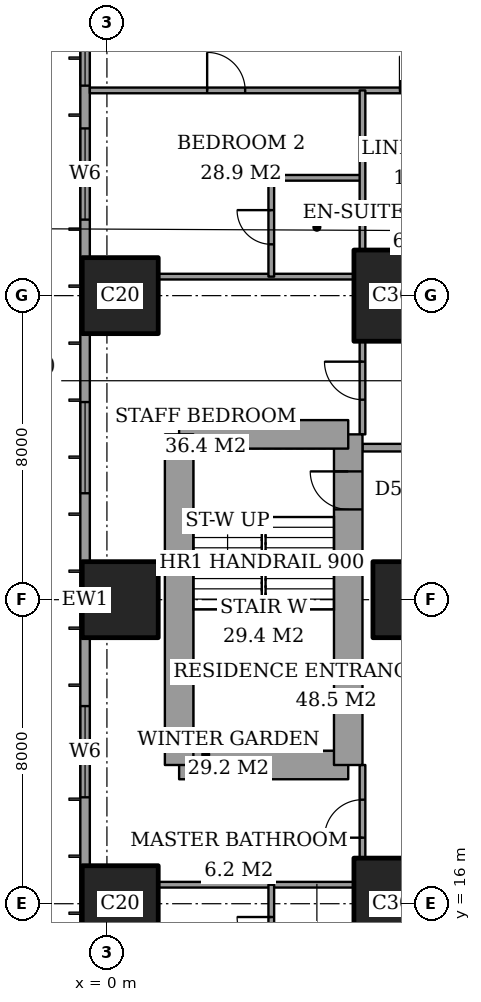
"""IFC4 building model, lengths in metres.
Left out: names, types, materials, properties, quantities, classifications, styles, units other than length and angle.
Written with IfcOpenShell. Run it as: python <this file> out.ifc"""

import sys

from ifc_helpers import new_model, si_unit, direction, frame, frame_2d, origin, origin_2d, place, context, subcontext, project, spatial, rectangle, extrude, element, fill, save


model = new_model("IFC4")
c1 = context("Model", 3, precision=1e-05, world=origin(), true_north=direction((0.0, 1.0)))
c2 = subcontext(c1, "Body", "Model", "MODEL_VIEW")
j1 = project(units=[si_unit("LENGTHUNIT", "METRE"), si_unit("PLANEANGLEUNIT", "RADIAN")], contexts=[c1])
p1 = place(None, origin())
s1 = spatial("IfcSite", under=j1, at=p1, CompositionType="ELEMENT")
p2 = place(p1, origin())
s2 = spatial("IfcBuilding", under=s1, at=p2, CompositionType="ELEMENT")
p3 = place(p2, frame((0.0, 0.0, 54.8)))
s3 = spatial("IfcBuildingStorey", under=s2, at=p3, CompositionType="ELEMENT", Elevation=54.8)
for number, where, z_axis, x_axis in (
    (1, (0.35, 16.0, 0.0), (0.0, 0.0, 1.0), (1.0, 0.0, 0.0)),
    (2, (0.35, 24.0, 0.0), (0.0, 0.0, 1.0), (1.0, 0.0, 0.0)),
    (3, (0.35, 32.0, 0.0), (0.0, 0.0, 1.0), (1.0, 0.0, 0.0)),
):
    element("IfcColumn", number, at=place(p3, frame(where, z_axis=z_axis, x_axis=x_axis)), inside=s3, PredefinedType="COLUMN", context=c2, shape_type="SweptSolid", body=[
        extrude(rectangle(XDim=2.0, YDim=2.0, at=origin_2d()), origin(), (0.0, 0.0, 1.0), 3.6),
    ])
p4 = place(p3, frame((8.0, 16.0, 0.0), z_axis=(0.0, 0.0, 1.0), x_axis=(1.0, 0.0, 0.0)))
e4 = element("IfcColumn", 4, at=p4, inside=s3, PredefinedType="COLUMN", context=c2, shape_type="SweptSolid", body=[
    extrude(rectangle(XDim=3.0, YDim=2.4, at=origin_2d()), origin(), (0.0, 0.0, 1.0), 3.6),
])
p5 = place(p3, frame((8.0, 24.0, 0.0), z_axis=(0.0, 0.0, 1.0), x_axis=(1.0, 0.0, 0.0)))
e5 = element("IfcColumn", 5, at=p5, inside=s3, PredefinedType="COLUMN", context=c2, shape_type="SweptSolid", body=[
    extrude(rectangle(XDim=2.0, YDim=2.0, at=origin_2d()), origin(), (0.0, 0.0, 1.0), 3.6),
])
p6 = place(p3, frame((8.0, 32.0, 0.0), z_axis=(0.0, 0.0, 1.0), x_axis=(1.0, 0.0, 0.0)))
e6 = element("IfcColumn", 6, at=p6, inside=s3, PredefinedType="COLUMN", context=c2, shape_type="SweptSolid", body=[
    extrude(rectangle(XDim=3.0, YDim=2.4, at=origin_2d()), origin(), (0.0, 0.0, 1.0), 3.6),
])
p7 = place(p3, frame((1.9, 19.65, 0.0), z_axis=(0.0, 0.0, 1.0), x_axis=(1.0, 0.0, 0.0)))
e7 = element("IfcWall", 7, at=p7, inside=s3, PredefinedType="SHEAR", context=c2, shape_type="SweptSolid", body=[
    extrude(rectangle(XDim=4.45, YDim=0.75, at=frame_2d((2.225, 0.0))), origin(), (0.0, 0.0, 1.0), 3.6),
])
p8 = place(p3, frame((6.35, 19.65, 0.0), z_axis=(0.0, 0.0, 1.0), x_axis=(0.0, 1.0, 0.0)))
e8 = element("IfcWall", 8, at=p8, inside=s3, PredefinedType="SHEAR", context=c2, shape_type="SweptSolid", body=[
    extrude(rectangle(XDim=8.7, YDim=0.75, at=frame_2d((4.35, 0.0))), origin(), (0.0, 0.0, 1.0), 3.6),
])
p9 = place(p8, frame((6.725, 0.0, 0.0)))
e9 = element("IfcOpeningElement", 9, at=p9, cuts=e8, PredefinedType="OPENING", context=c2, shape_type="SweptSolid", body=[
    extrude(rectangle(XDim=1.0, YDim=2.1, at=frame_2d((0.5, 1.05))), frame((0.0, 0.385, 0.0), z_axis=(0.0, -1.0, 0.0), x_axis=(1.0, 0.0, 0.0)), (0.0, 0.0, 1.0), 0.77),
])
p10 = place(p3, frame((6.35, 28.35, 0.0), z_axis=(0.0, 0.0, 1.0), x_axis=(-1.0, 0.0, 0.0)))
e10 = element("IfcWall", 10, at=p10, inside=s3, PredefinedType="SHEAR", context=c2, shape_type="SweptSolid", body=[
    extrude(rectangle(XDim=4.45, YDim=0.75, at=frame_2d((2.225, 0.0))), origin(), (0.0, 0.0, 1.0), 3.6),
])
p11 = place(p3, frame((1.9, 28.35, 0.0), z_axis=(0.0, 0.0, 1.0), x_axis=(0.0, -1.0, 0.0)))
e11 = element("IfcWall", 11, at=p11, inside=s3, PredefinedType="SHEAR", context=c2, shape_type="SweptSolid", body=[
    extrude(rectangle(XDim=8.7, YDim=0.75, at=frame_2d((4.35, 0.0))), origin(), (0.0, 0.0, 1.0), 3.6),
])
p12 = place(p3, frame((-0.575, 44.825, 0.0), z_axis=(0.0, 0.0, 1.0), x_axis=(0.0, -1.0, 0.0)))
e12 = element("IfcWall", 12, at=p12, inside=s3, PredefinedType="SOLIDWALL", context=c2, shape_type="SweptSolid", body=[
    extrude(rectangle(XDim=41.65, YDim=0.25, at=frame_2d((20.825, 0.0))), origin(), (0.0, 0.0, 1.0), 3.6),
])
p13 = place(p12, frame((0.775, 0.0, 0.6)))
e13 = element("IfcOpeningElement", 13, at=p13, cuts=e12, PredefinedType="OPENING", context=c2, shape_type="SweptSolid", body=[
    extrude(rectangle(XDim=2.4, YDim=2.0, at=frame_2d((1.2, 1.0))), frame((0.0, 0.135, 0.0), z_axis=(0.0, -1.0, 0.0), x_axis=(1.0, 0.0, 0.0)), (0.0, 0.0, 1.0), 0.27),
])
p14 = place(p12, frame((6.1, 0.0, 0.6)))
e14 = element("IfcOpeningElement", 14, at=p14, cuts=e12, PredefinedType="OPENING", context=c2, shape_type="SweptSolid", body=[
    extrude(rectangle(XDim=1.2, YDim=2.0, at=frame_2d((0.6, 1.0))), frame((0.0, 0.135, 0.0), z_axis=(0.0, -1.0, 0.0), x_axis=(1.0, 0.0, 0.0)), (0.0, 0.0, 1.0), 0.27),
])
p15 = place(p12, frame((8.425, 0.0, 0.6)))
e15 = element("IfcOpeningElement", 15, at=p15, cuts=e12, PredefinedType="OPENING", context=c2, shape_type="SweptSolid", body=[
    extrude(rectangle(XDim=2.4, YDim=2.0, at=frame_2d((1.2, 1.0))), frame((0.0, 0.135, 0.0), z_axis=(0.0, -1.0, 0.0), x_axis=(1.0, 0.0, 0.0)), (0.0, 0.0, 1.0), 0.27),
])
p16 = place(p12, frame((15.625, 0.0, 0.6)))
e16 = element("IfcOpeningElement", 16, at=p16, cuts=e12, PredefinedType="OPENING", context=c2, shape_type="SweptSolid", body=[
    extrude(rectangle(XDim=2.4, YDim=2.0, at=frame_2d((1.2, 1.0))), frame((0.0, 0.135, 0.0), z_axis=(0.0, -1.0, 0.0), x_axis=(1.0, 0.0, 0.0)), (0.0, 0.0, 1.0), 0.27),
])
p17 = place(p12, frame((23.625, 0.0, 0.6)))
e17 = element("IfcOpeningElement", 17, at=p17, cuts=e12, PredefinedType="OPENING", context=c2, shape_type="SweptSolid", body=[
    extrude(rectangle(XDim=2.4, YDim=2.0, at=frame_2d((1.2, 1.0))), frame((0.0, 0.135, 0.0), z_axis=(0.0, -1.0, 0.0), x_axis=(1.0, 0.0, 0.0)), (0.0, 0.0, 1.0), 0.27),
])
p18 = place(p12, frame((30.825, 0.0, 0.6)))
e18 = element("IfcOpeningElement", 18, at=p18, cuts=e12, PredefinedType="OPENING", context=c2, shape_type="SweptSolid", body=[
    extrude(rectangle(XDim=2.4, YDim=2.0, at=frame_2d((1.2, 1.0))), frame((0.0, 0.135, 0.0), z_axis=(0.0, -1.0, 0.0), x_axis=(1.0, 0.0, 0.0)), (0.0, 0.0, 1.0), 0.27),
])
p19 = place(p12, frame((34.5, 0.0, 0.6)))
e19 = element("IfcOpeningElement", 19, at=p19, cuts=e12, PredefinedType="OPENING", context=c2, shape_type="SweptSolid", body=[
    extrude(rectangle(XDim=1.2, YDim=2.0, at=frame_2d((0.6, 1.0))), frame((0.0, 0.135, 0.0), z_axis=(0.0, -1.0, 0.0), x_axis=(1.0, 0.0, 0.0)), (0.0, 0.0, 1.0), 0.27),
])
p20 = place(p12, frame((38.475, 0.0, 0.6)))
e20 = element("IfcOpeningElement", 20, at=p20, cuts=e12, PredefinedType="OPENING", context=c2, shape_type="SweptSolid", body=[
    extrude(rectangle(XDim=2.4, YDim=2.0, at=frame_2d((1.2, 1.0))), frame((0.0, 0.135, 0.0), z_axis=(0.0, -1.0, 0.0), x_axis=(1.0, 0.0, 0.0)), (0.0, 0.0, 1.0), 0.27),
])
p21 = place(p3, frame((1.35, 16.5, 0.0), z_axis=(0.0, 0.0, 1.0), x_axis=(1.0, 0.0, 0.0)))
e21 = element("IfcWall", 21, at=p21, inside=s3, PredefinedType="PARTITIONING", context=c2, shape_type="SweptSolid", body=[
    extrude(rectangle(XDim=5.15, YDim=0.15, at=frame_2d((2.575, 0.0))), origin(), (0.0, 0.0, 1.0), 3.35),
])
p22 = place(p3, frame((6.725, 28.0, 0.0), z_axis=(0.0, 0.0, 1.0), x_axis=(1.0, 0.0, 0.0)))
e22 = element("IfcWall", 22, at=p22, inside=s3, PredefinedType="PARTITIONING", context=c2, shape_type="SweptSolid", body=[
    extrude(rectangle(XDim=17.275, YDim=0.2, at=frame_2d((8.637, 0.0))), origin(), (0.0, 0.0, 1.0), 3.35),
])
p23 = place(p22, frame((6.475, 0.0, 0.0)))
e23 = element("IfcOpeningElement", 23, at=p23, cuts=e22, PredefinedType="OPENING", context=c2, shape_type="SweptSolid", body=[
    extrude(rectangle(XDim=1.2, YDim=2.4, at=frame_2d((0.6, 1.2))), frame((0.0, 0.11, 0.0), z_axis=(0.0, -1.0, 0.0), x_axis=(1.0, 0.0, 0.0)), (0.0, 0.0, 1.0), 0.22),
])
p24 = place(p3, frame((1.35, 32.5, 0.0), z_axis=(0.0, 0.0, 1.0), x_axis=(1.0, 0.0, 0.0)))
e24 = element("IfcWall", 24, at=p24, inside=s3, PredefinedType="PARTITIONING", context=c2, shape_type="SweptSolid", body=[
    extrude(rectangle(XDim=5.15, YDim=0.15, at=frame_2d((2.575, 0.0))), origin(), (0.0, 0.0, 1.0), 3.35),
])
p25 = place(p3, frame((4.325, 35.1, 0.0), z_axis=(0.0, 0.0, 1.0), x_axis=(1.0, 0.0, 0.0)))
e25 = element("IfcWall", 25, at=p25, inside=s3, PredefinedType="PARTITIONING", context=c2, shape_type="SweptSolid", body=[
    extrude(rectangle(XDim=2.4, YDim=0.15, at=frame_2d((1.2, 0.0))), origin(), (0.0, 0.0, 1.0), 3.35),
])
p26 = place(p3, frame((-0.45, 37.4, 0.0), z_axis=(0.0, 0.0, 1.0), x_axis=(1.0, 0.0, 0.0)))
e26 = element("IfcWall", 26, at=p26, inside=s3, PredefinedType="PARTITIONING", context=c2, shape_type="SweptSolid", body=[
    extrude(rectangle(XDim=25.011, YDim=0.15, at=frame_2d((12.505, 0.0))), origin(), (0.0, 0.0, 1.0), 3.35),
])
p27 = place(p26, frame((10.65, 0.0, 0.0)))
e27 = element("IfcOpeningElement", 27, at=p27, cuts=e26, PredefinedType="OPENING", context=c2, shape_type="SweptSolid", body=[
    extrude(rectangle(XDim=1.0, YDim=2.1, at=frame_2d((0.5, 1.05))), frame((0.0, 0.085, 0.0), z_axis=(0.0, -1.0, 0.0), x_axis=(1.0, 0.0, 0.0)), (0.0, 0.0, 1.0), 0.17),
])
p28 = place(p26, frame((3.087, 0.0, 0.0)))
e28 = element("IfcOpeningElement", 28, at=p28, cuts=e26, PredefinedType="OPENING", context=c2, shape_type="SweptSolid", body=[
    extrude(rectangle(XDim=1.0, YDim=2.1, at=frame_2d((0.5, 1.05))), frame((0.0, 0.085, 0.0), z_axis=(0.0, -1.0, 0.0), x_axis=(1.0, 0.0, 0.0)), (0.0, 0.0, 1.0), 0.17),
])
p29 = place(p26, frame((8.163, 0.0, 0.0)))
e29 = element("IfcOpeningElement", 29, at=p29, cuts=e26, PredefinedType="OPENING", context=c2, shape_type="SweptSolid", body=[
    extrude(rectangle(XDim=0.9, YDim=2.1, at=frame_2d((0.45, 1.05))), frame((0.0, 0.085, 0.0), z_axis=(0.0, -1.0, 0.0), x_axis=(1.0, 0.0, 0.0)), (0.0, 0.0, 1.0), 0.17),
])
p30 = place(p26, frame((13.35, 0.0, 0.0)))
e30 = element("IfcOpeningElement", 30, at=p30, cuts=e26, PredefinedType="OPENING", context=c2, shape_type="SweptSolid", body=[
    extrude(rectangle(XDim=1.0, YDim=2.1, at=frame_2d((0.5, 1.05))), frame((0.0, 0.085, 0.0), z_axis=(0.0, -1.0, 0.0), x_axis=(1.0, 0.0, 0.0)), (0.0, 0.0, 1.0), 0.17),
])
p31 = place(p26, frame((16.45, 0.0, 0.0)))
e31 = element("IfcOpeningElement", 31, at=p31, cuts=e26, PredefinedType="OPENING", context=c2, shape_type="SweptSolid", body=[
    extrude(rectangle(XDim=1.0, YDim=2.1, at=frame_2d((0.5, 1.05))), frame((0.0, 0.085, 0.0), z_axis=(0.0, -1.0, 0.0), x_axis=(1.0, 0.0, 0.0)), (0.0, 0.0, 1.0), 0.17),
])
p32 = place(p26, frame((21.175, 0.0, 0.0)))
e32 = element("IfcOpeningElement", 32, at=p32, cuts=e26, PredefinedType="OPENING", context=c2, shape_type="SweptSolid", body=[
    extrude(rectangle(XDim=1.0, YDim=2.1, at=frame_2d((0.5, 1.05))), frame((0.0, 0.085, 0.0), z_axis=(0.0, -1.0, 0.0), x_axis=(1.0, 0.0, 0.0)), (0.0, 0.0, 1.0), 0.17),
])
p33 = place(p3, frame((4.325, 13.9, 0.0), z_axis=(0.0, 0.0, 1.0), x_axis=(0.0, 1.0, 0.0)))
e33 = element("IfcWall", 33, at=p33, inside=s3, PredefinedType="PARTITIONING", context=c2, shape_type="SweptSolid", body=[
    extrude(rectangle(XDim=2.6, YDim=0.15, at=frame_2d((1.3, 0.0))), origin(), (0.0, 0.0, 1.0), 3.35),
])
p34 = place(p33, frame((0.85, 0.0, 0.0)))
e34 = element("IfcOpeningElement", 34, at=p34, cuts=e33, PredefinedType="OPENING", context=c2, shape_type="SweptSolid", body=[
    extrude(rectangle(XDim=0.9, YDim=2.1, at=frame_2d((0.45, 1.05))), frame((0.0, 0.085, 0.0), z_axis=(0.0, -1.0, 0.0), x_axis=(1.0, 0.0, 0.0)), (0.0, 0.0, 1.0), 0.17),
])
p35 = place(p3, frame((4.325, 32.5, 0.0), z_axis=(0.0, 0.0, 1.0), x_axis=(0.0, 1.0, 0.0)))
e35 = element("IfcWall", 35, at=p35, inside=s3, PredefinedType="PARTITIONING", context=c2, shape_type="SweptSolid", body=[
    extrude(rectangle(XDim=2.6, YDim=0.15, at=frame_2d((1.3, 0.0))), origin(), (0.0, 0.0, 1.0), 3.35),
])
p36 = place(p35, frame((0.85, 0.0, 0.0)))
e36 = element("IfcOpeningElement", 36, at=p36, cuts=e35, PredefinedType="OPENING", context=c2, shape_type="SweptSolid", body=[
    extrude(rectangle(XDim=0.9, YDim=2.1, at=frame_2d((0.45, 1.05))), frame((0.0, 0.085, 0.0), z_axis=(0.0, -1.0, 0.0), x_axis=(1.0, 0.0, 0.0)), (0.0, 0.0, 1.0), 0.17),
])
p37 = place(p3, frame((6.725, 17.2, 0.0), z_axis=(0.0, 0.0, 1.0), x_axis=(0.0, 1.0, 0.0)))
e37 = element("IfcWall", 37, at=p37, inside=s3, PredefinedType="PARTITIONING", context=c2, shape_type="SweptSolid", body=[
    extrude(rectangle(XDim=2.45, YDim=0.15, at=frame_2d((1.225, 0.0))), origin(), (0.0, 0.0, 1.0), 3.35),
])
p38 = place(p37, frame((0.538, 0.0, 0.0)))
e38 = element("IfcOpeningElement", 38, at=p38, cuts=e37, PredefinedType="OPENING", context=c2, shape_type="SweptSolid", body=[
    extrude(rectangle(XDim=1.0, YDim=2.1, at=frame_2d((0.5, 1.05))), frame((0.0, 0.085, 0.0), z_axis=(0.0, -1.0, 0.0), x_axis=(1.0, 0.0, 0.0)), (0.0, 0.0, 1.0), 0.17),
])
p39 = place(p3, frame((6.725, 28.35, 0.0), z_axis=(0.0, 0.0, 1.0), x_axis=(0.0, 1.0, 0.0)))
e39 = element("IfcWall", 39, at=p39, inside=s3, PredefinedType="PARTITIONING", context=c2, shape_type="SweptSolid", body=[
    extrude(rectangle(XDim=2.45, YDim=0.15, at=frame_2d((1.225, 0.0))), origin(), (0.0, 0.0, 1.0), 3.35),
])
p40 = place(p39, frame((0.913, 0.0, 0.0)))
e40 = element("IfcOpeningElement", 40, at=p40, cuts=e39, PredefinedType="OPENING", context=c2, shape_type="SweptSolid", body=[
    extrude(rectangle(XDim=1.0, YDim=2.1, at=frame_2d((0.5, 1.05))), frame((0.0, 0.085, 0.0), z_axis=(0.0, -1.0, 0.0), x_axis=(1.0, 0.0, 0.0)), (0.0, 0.0, 1.0), 0.17),
])
p41 = place(p3, frame((6.725, 33.2, 0.0), z_axis=(0.0, 0.0, 1.0), x_axis=(0.0, 1.0, 0.0)))
e41 = element("IfcWall", 41, at=p41, inside=s3, PredefinedType="PARTITIONING", context=c2, shape_type="SweptSolid", body=[
    extrude(rectangle(XDim=4.2, YDim=0.15, at=frame_2d((2.1, 0.0))), origin(), (0.0, 0.0, 1.0), 3.35),
])
p42 = place(p14, origin())
e42 = element("IfcWindow", 42, at=p42, inside=s3, PartitioningType="SINGLE_PANEL", PredefinedType="WINDOW", context=c2, shape_type="SweptSolid", body=[
    extrude(rectangle(XDim=1.2, YDim=2.0, at=frame_2d((0.6, 1.0))), frame((0.0, 0.03, 0.0), z_axis=(0.0, -1.0, 0.0), x_axis=(1.0, 0.0, 0.0)), (0.0, 0.0, 1.0), 0.06),
])
fill(e14, e42)
p43 = place(p15, origin())
e43 = element("IfcWindow", 43, at=p43, inside=s3, PartitioningType="SINGLE_PANEL", PredefinedType="WINDOW", context=c2, shape_type="SweptSolid", body=[
    extrude(rectangle(XDim=2.4, YDim=2.0, at=frame_2d((1.2, 1.0))), frame((0.0, 0.03, 0.0), z_axis=(0.0, -1.0, 0.0), x_axis=(1.0, 0.0, 0.0)), (0.0, 0.0, 1.0), 0.06),
])
fill(e15, e43)
p44 = place(p16, origin())
e44 = element("IfcWindow", 44, at=p44, inside=s3, PartitioningType="SINGLE_PANEL", PredefinedType="WINDOW", context=c2, shape_type="SweptSolid", body=[
    extrude(rectangle(XDim=2.4, YDim=2.0, at=frame_2d((1.2, 1.0))), frame((0.0, 0.03, 0.0), z_axis=(0.0, -1.0, 0.0), x_axis=(1.0, 0.0, 0.0)), (0.0, 0.0, 1.0), 0.06),
])
fill(e16, e44)
p45 = place(p17, origin())
e45 = element("IfcWindow", 45, at=p45, inside=s3, PartitioningType="SINGLE_PANEL", PredefinedType="WINDOW", context=c2, shape_type="SweptSolid", body=[
    extrude(rectangle(XDim=2.4, YDim=2.0, at=frame_2d((1.2, 1.0))), frame((0.0, 0.03, 0.0), z_axis=(0.0, -1.0, 0.0), x_axis=(1.0, 0.0, 0.0)), (0.0, 0.0, 1.0), 0.06),
])
fill(e17, e45)
p46 = place(p34, origin())
e46 = element("IfcDoor", 46, at=p46, inside=s3, OperationType="SINGLE_SWING_LEFT", PredefinedType="DOOR", context=c2, shape_type="SweptSolid", body=[
    extrude(rectangle(XDim=0.9, YDim=2.1, at=frame_2d((0.45, 1.05))), frame((0.0, 0.025, 0.0), z_axis=(0.0, -1.0, 0.0), x_axis=(1.0, 0.0, 0.0)), (0.0, 0.0, 1.0), 0.05),
])
fill(e34, e46)
p47 = place(p38, origin())
e47 = element("IfcDoor", 47, at=p47, inside=s3, OperationType="SINGLE_SWING_RIGHT", PredefinedType="DOOR", context=c2, shape_type="SweptSolid", body=[
    extrude(rectangle(XDim=1.0, YDim=2.1, at=frame_2d((0.5, 1.05))), frame((0.0, 0.025, 0.0), z_axis=(0.0, -1.0, 0.0), x_axis=(1.0, 0.0, 0.0)), (0.0, 0.0, 1.0), 0.05),
])
fill(e38, e47)
p48 = place(p36, origin())
e48 = element("IfcDoor", 48, at=p48, inside=s3, OperationType="SINGLE_SWING_LEFT", PredefinedType="DOOR", context=c2, shape_type="SweptSolid", body=[
    extrude(rectangle(XDim=0.9, YDim=2.1, at=frame_2d((0.45, 1.05))), frame((0.0, 0.025, 0.0), z_axis=(0.0, -1.0, 0.0), x_axis=(1.0, 0.0, 0.0)), (0.0, 0.0, 1.0), 0.05),
])
fill(e36, e48)
p49 = place(p28, origin())
e49 = element("IfcDoor", 49, at=p49, inside=s3, OperationType="SINGLE_SWING_RIGHT", PredefinedType="DOOR", context=c2, shape_type="SweptSolid", body=[
    extrude(rectangle(XDim=1.0, YDim=2.1, at=frame_2d((0.5, 1.05))), frame((0.0, 0.025, 0.0), z_axis=(0.0, -1.0, 0.0), x_axis=(1.0, 0.0, 0.0)), (0.0, 0.0, 1.0), 0.05),
])
fill(e28, e49)
p50 = place(p40, origin())
e50 = element("IfcDoor", 50, at=p50, inside=s3, OperationType="SINGLE_SWING_LEFT", PredefinedType="DOOR", context=c2, shape_type="SweptSolid", body=[
    extrude(rectangle(XDim=1.0, YDim=2.1, at=frame_2d((0.5, 1.05))), frame((0.0, 0.025, 0.0), z_axis=(0.0, -1.0, 0.0), x_axis=(1.0, 0.0, 0.0)), (0.0, 0.0, 1.0), 0.05),
])
fill(e40, e50)
p51 = place(p29, origin())
e51 = element("IfcDoor", 51, at=p51, inside=s3, OperationType="SINGLE_SWING_RIGHT", PredefinedType="DOOR", context=c2, shape_type="SweptSolid", body=[
    extrude(rectangle(XDim=0.9, YDim=2.1, at=frame_2d((0.45, 1.05))), frame((0.0, 0.025, 0.0), z_axis=(0.0, -1.0, 0.0), x_axis=(1.0, 0.0, 0.0)), (0.0, 0.0, 1.0), 0.05),
])
fill(e29, e51)
p52 = place(p9, origin())
e52 = element("IfcDoor", 52, at=p52, inside=s3, OperationType="SINGLE_SWING_LEFT", PredefinedType="DOOR", context=c2, shape_type="SweptSolid", body=[
    extrude(rectangle(XDim=1.0, YDim=2.1, at=frame_2d((0.5, 1.05))), frame((0.0, 0.025, 0.0), z_axis=(0.0, -1.0, 0.0), x_axis=(1.0, 0.0, 0.0)), (0.0, 0.0, 1.0), 0.05),
])
fill(e9, e52)
save(model, sys.argv[1])
